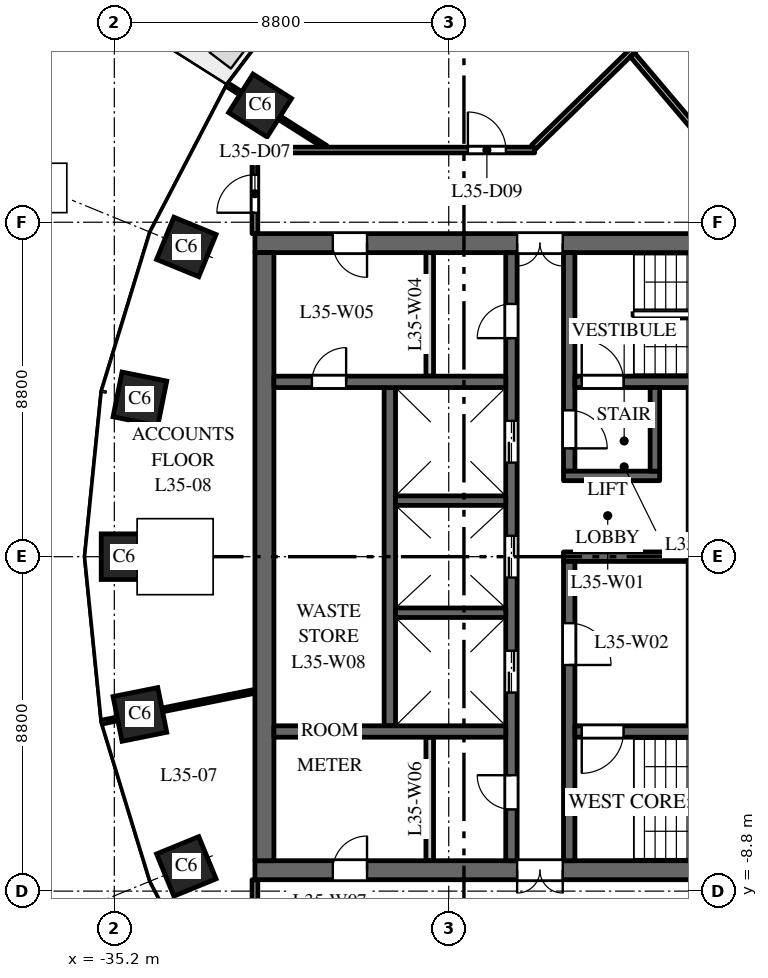
"""IFC4 building model, lengths in metres.
Left out: names, types, materials, properties, quantities, classifications, styles, units other than length and angle.
Written with IfcOpenShell. Run it as: python <this file> out.ifc"""

import sys

from ifc_helpers import new_model, si_unit, direction, frame, frame_2d, origin, origin_2d, place, context, subcontext, project, spatial, rectangle, extrude, element, fill, save


model = new_model("IFC4")
c1 = context("Model", 3, precision=1e-05, world=origin(), true_north=direction((0.0, 1.0)))
c2 = subcontext(c1, "Body", "Model", "MODEL_VIEW")
j1 = project(units=[si_unit("LENGTHUNIT", "METRE"), si_unit("PLANEANGLEUNIT", "RADIAN")], contexts=[c1])
p1 = place(None, origin())
s1 = spatial("IfcSite", under=j1, at=p1, CompositionType="ELEMENT")
p2 = place(p1, origin())
s2 = spatial("IfcBuilding", under=s1, at=p2, CompositionType="ELEMENT")
p3 = place(p2, frame((0.0, 0.0, 154.0)))
s3 = spatial("IfcBuildingStorey", under=s2, at=p3, CompositionType="ELEMENT", Elevation=154.0)
for number, where, z_axis, x_axis in (
    (1, (-31.365, 11.871, 0.0), (0.0, 0.0, 1.0), (-0.535, -0.845, 0.0)),
    (2, (-33.305, 8.149, 0.0), (0.0, 0.0, 1.0), (-0.379, -0.925, 0.0)),
    (3, (-34.527, 4.151, 0.0), (0.0, 0.0, 1.0), (-0.197, -0.98, 0.0)),
    (4, (-34.945, 0.0, 0.0), (0.0, 0.0, 1.0), (0.0, -1.0, 0.0)),
    (5, (-34.527, -4.151, 0.0), (0.0, 0.0, 1.0), (0.197, -0.98, 0.0)),
    (6, (-33.305, -8.149, 0.0), (0.0, 0.0, 1.0), (0.379, -0.925, 0.0)),
):
    element("IfcColumn", number, at=place(p3, frame(where, z_axis=z_axis, x_axis=x_axis)), inside=s3, PredefinedType="COLUMN", context=c2, shape_type="SweptSolid", body=[
        extrude(rectangle(XDim=1.2, YDim=1.2, at=origin_2d()), origin(), (0.0, 0.0, 1.0), 4.0),
    ])
p4 = place(p3, frame((-16.5, 8.25, 0.0), z_axis=(0.0, 0.0, 1.0), x_axis=(-1.0, 0.0, 0.0)))
e7 = element("IfcWall", 7, at=p4, inside=s3, PredefinedType="SHEAR", context=c2, shape_type="SweptSolid", body=[
    extrude(rectangle(XDim=15.0, YDim=0.5, at=frame_2d((7.5, 0.0))), origin(), (0.0, 0.0, 1.0), 3.7),
])
p5 = place(p4, frame((6.9, 0.0, 0.0)))
e8 = element("IfcOpeningElement", 8, at=p5, cuts=e7, PredefinedType="OPENING", context=c2, shape_type="SweptSolid", body=[
    extrude(rectangle(XDim=1.2, YDim=2.1, at=frame_2d((0.6, 1.05))), frame((0.0, 0.26, 0.0), z_axis=(0.0, -1.0, 0.0), x_axis=(1.0, 0.0, 0.0)), (0.0, 0.0, 1.0), 0.52),
])
p6 = place(p4, frame((12.05, 0.0, 0.0)))
e9 = element("IfcOpeningElement", 9, at=p6, cuts=e7, PredefinedType="OPENING", context=c2, shape_type="SweptSolid", body=[
    extrude(rectangle(XDim=0.9, YDim=2.1, at=frame_2d((0.45, 1.05))), frame((0.0, 0.26, 0.0), z_axis=(0.0, -1.0, 0.0), x_axis=(1.0, 0.0, 0.0)), (0.0, 0.0, 1.0), 0.52),
])
p7 = place(p3, frame((-16.5, -8.25, 0.0), z_axis=(0.0, 0.0, 1.0), x_axis=(-1.0, 0.0, 0.0)))
e10 = element("IfcWall", 10, at=p7, inside=s3, PredefinedType="SHEAR", context=c2, shape_type="SweptSolid", body=[
    extrude(rectangle(XDim=15.0, YDim=0.5, at=frame_2d((7.5, 0.0))), origin(), (0.0, 0.0, 1.0), 3.7),
])
p8 = place(p7, frame((6.9, 0.0, 0.0)))
e11 = element("IfcOpeningElement", 11, at=p8, cuts=e10, PredefinedType="OPENING", context=c2, shape_type="SweptSolid", body=[
    extrude(rectangle(XDim=1.2, YDim=2.1, at=frame_2d((0.6, 1.05))), frame((0.0, 0.26, 0.0), z_axis=(0.0, -1.0, 0.0), x_axis=(1.0, 0.0, 0.0)), (0.0, 0.0, 1.0), 0.52),
])
p9 = place(p7, frame((12.05, 0.0, 0.0)))
e12 = element("IfcOpeningElement", 12, at=p9, cuts=e10, PredefinedType="OPENING", context=c2, shape_type="SweptSolid", body=[
    extrude(rectangle(XDim=0.9, YDim=2.1, at=frame_2d((0.45, 1.05))), frame((0.0, 0.26, 0.0), z_axis=(0.0, -1.0, 0.0), x_axis=(1.0, 0.0, 0.0)), (0.0, 0.0, 1.0), 0.52),
])
p10 = place(p3, frame((-27.95, -4.45, 0.0), z_axis=(0.0, 0.0, 1.0), x_axis=(0.0, 1.0, 0.0)))
e13 = element("IfcWall", 13, at=p10, inside=s3, PredefinedType="SHEAR", context=c2, shape_type="SweptSolid", body=[
    extrude(rectangle(XDim=8.9, YDim=0.3, at=frame_2d((4.45, 0.0))), origin(), (0.0, 0.0, 1.0), 3.7),
])
p11 = place(p3, frame((-24.75, -8.0, 0.0), z_axis=(0.0, 0.0, 1.0), x_axis=(0.0, 1.0, 0.0)))
e14 = element("IfcWall", 14, at=p11, inside=s3, PredefinedType="SHEAR", context=c2, shape_type="SweptSolid", body=[
    extrude(rectangle(XDim=16.0, YDim=0.3, at=frame_2d((8.0, 0.0))), origin(), (0.0, 0.0, 1.0), 3.7),
])
p12 = place(p11, frame((4.425, 0.0, 0.0)))
e15 = element("IfcOpeningElement", 15, at=p12, cuts=e14, PredefinedType="OPENING", context=c2, shape_type="SweptSolid", body=[
    extrude(rectangle(XDim=1.1, YDim=2.1, at=frame_2d((0.55, 1.05))), frame((0.0, 0.16, 0.0), z_axis=(0.0, -1.0, 0.0), x_axis=(1.0, 0.0, 0.0)), (0.0, 0.0, 1.0), 0.32),
])
p13 = place(p11, frame((7.45, 0.0, 0.0)))
e16 = element("IfcOpeningElement", 16, at=p13, cuts=e14, PredefinedType="OPENING", context=c2, shape_type="SweptSolid", body=[
    extrude(rectangle(XDim=1.1, YDim=2.1, at=frame_2d((0.55, 1.05))), frame((0.0, 0.16, 0.0), z_axis=(0.0, -1.0, 0.0), x_axis=(1.0, 0.0, 0.0)), (0.0, 0.0, 1.0), 0.32),
])
p14 = place(p11, frame((10.475, 0.0, 0.0)))
e17 = element("IfcOpeningElement", 17, at=p14, cuts=e14, PredefinedType="OPENING", context=c2, shape_type="SweptSolid", body=[
    extrude(rectangle(XDim=1.1, YDim=2.1, at=frame_2d((0.55, 1.05))), frame((0.0, 0.16, 0.0), z_axis=(0.0, -1.0, 0.0), x_axis=(1.0, 0.0, 0.0)), (0.0, 0.0, 1.0), 0.32),
])
p15 = place(p11, frame((13.75, 0.0, 0.0)))
e18 = element("IfcOpeningElement", 18, at=p15, cuts=e14, PredefinedType="OPENING", context=c2, shape_type="SweptSolid", body=[
    extrude(rectangle(XDim=0.9, YDim=2.1, at=frame_2d((0.45, 1.05))), frame((0.0, 0.16, 0.0), z_axis=(0.0, -1.0, 0.0), x_axis=(1.0, 0.0, 0.0)), (0.0, 0.0, 1.0), 0.32),
])
p16 = place(p11, frame((1.35, 0.0, 0.0)))
e19 = element("IfcOpeningElement", 19, at=p16, cuts=e14, PredefinedType="OPENING", context=c2, shape_type="SweptSolid", body=[
    extrude(rectangle(XDim=0.9, YDim=2.1, at=frame_2d((0.45, 1.05))), frame((0.0, 0.16, 0.0), z_axis=(0.0, -1.0, 0.0), x_axis=(1.0, 0.0, 0.0)), (0.0, 0.0, 1.0), 0.32),
])
p17 = place(p3, frame((-20.1, 0.0, 0.0), z_axis=(0.0, 0.0, 1.0), x_axis=(-1.0, 0.0, 0.0)))
e20 = element("IfcWall", 20, at=p17, inside=s3, PredefinedType="SHEAR", context=c2, shape_type="SweptSolid", body=[
    extrude(rectangle(XDim=3.28, YDim=0.25, at=frame_2d((1.64, 0.0))), origin(), (0.0, 0.0, 1.0), 3.7),
])
p18 = place(p3, frame((-31.25, -8.0, 0.0), z_axis=(0.0, 0.0, 1.0), x_axis=(0.0, 1.0, 0.0)))
e21 = element("IfcWall", 21, at=p18, inside=s3, PredefinedType="SHEAR", context=c2, shape_type="SweptSolid", body=[
    extrude(rectangle(XDim=16.0, YDim=0.5, at=frame_2d((8.0, 0.0))), origin(), (0.0, 0.0, 1.0), 3.7),
])
p19 = place(p3, frame((-24.9, 4.6, 0.0), z_axis=(0.0, 0.0, 1.0), x_axis=(-1.0, 0.0, 0.0)))
e22 = element("IfcWall", 22, at=p19, inside=s3, PredefinedType="SHEAR", context=c2, shape_type="SweptSolid", body=[
    extrude(rectangle(XDim=6.1, YDim=0.3, at=frame_2d((3.05, 0.0))), origin(), (0.0, 0.0, 1.0), 3.7),
])
p20 = place(p19, frame((4.2, 0.0, 0.0)))
e23 = element("IfcOpeningElement", 23, at=p20, cuts=e22, PredefinedType="OPENING", context=c2, shape_type="SweptSolid", body=[
    extrude(rectangle(XDim=0.9, YDim=2.1, at=frame_2d((0.45, 1.05))), frame((0.0, 0.16, 0.0), z_axis=(0.0, -1.0, 0.0), x_axis=(1.0, 0.0, 0.0)), (0.0, 0.0, 1.0), 0.32),
])
for number, where, z_axis, x_axis in (
    (24, (-26.9, 4.75, 0.0), (0.0, 0.0, 1.0), (0.0, 1.0, 0.0)),
    (25, (-26.9, -8.0, 0.0), (0.0, 0.0, 1.0), (0.0, 1.0, 0.0)),
):
    element("IfcWall", number, at=place(p3, frame(where, z_axis=z_axis, x_axis=x_axis)), inside=s3, PredefinedType="PARTITIONING", context=c2, shape_type="SweptSolid", body=[
        extrude(rectangle(XDim=3.25, YDim=0.2, at=frame_2d((1.625, 0.0))), origin(), (0.0, 0.0, 1.0), 3.7),
    ])
p21 = place(p3, frame((-24.9, -4.6, 0.0), z_axis=(0.0, 0.0, 1.0), x_axis=(-1.0, 0.0, 0.0)))
e26 = element("IfcWall", 26, at=p21, inside=s3, PredefinedType="SHEAR", context=c2, shape_type="SweptSolid", body=[
    extrude(rectangle(XDim=6.1, YDim=0.3, at=frame_2d((3.05, 0.0))), origin(), (0.0, 0.0, 1.0), 3.7),
])
for number, where, z_axis, x_axis in (
    (27, (-24.9, -1.475, 0.0), (0.0, 0.0, 1.0), (-1.0, 0.0, 0.0)),
    (28, (-24.9, 1.475, 0.0), (0.0, 0.0, 1.0), (-1.0, 0.0, 0.0)),
):
    element("IfcWall", number, at=place(p3, frame(where, z_axis=z_axis, x_axis=x_axis)), inside=s3, PredefinedType="SHEAR", context=c2, shape_type="SweptSolid", body=[
        extrude(rectangle(XDim=2.9, YDim=0.25, at=frame_2d((1.45, 0.0))), origin(), (0.0, 0.0, 1.0), 3.7),
    ])
p22 = place(p3, frame((-23.23, 2.25, 0.0), z_axis=(0.0, 0.0, 1.0), x_axis=(0.0, 1.0, 0.0)))
e29 = element("IfcWall", 29, at=p22, inside=s3, PredefinedType="SHEAR", context=c2, shape_type="SweptSolid", body=[
    extrude(rectangle(XDim=5.75, YDim=0.3, at=frame_2d((2.875, 0.0))), origin(), (0.0, 0.0, 1.0), 3.7),
])
p23 = place(p22, frame((0.6, 0.0, 0.0)))
e30 = element("IfcOpeningElement", 30, at=p23, cuts=e29, PredefinedType="OPENING", context=c2, shape_type="SweptSolid", body=[
    extrude(rectangle(XDim=1.0, YDim=2.1, at=frame_2d((0.5, 1.05))), frame((0.0, 0.16, 0.0), z_axis=(0.0, -1.0, 0.0), x_axis=(1.0, 0.0, 0.0)), (0.0, 0.0, 1.0), 0.32),
])
p24 = place(p3, frame((-23.23, -8.0, 0.0), z_axis=(0.0, 0.0, 1.0), x_axis=(0.0, 1.0, 0.0)))
e31 = element("IfcWall", 31, at=p24, inside=s3, PredefinedType="SHEAR", context=c2, shape_type="SweptSolid", body=[
    extrude(rectangle(XDim=7.875, YDim=0.3, at=frame_2d((3.938, 0.0))), origin(), (0.0, 0.0, 1.0), 3.7),
])
p25 = place(p24, frame((5.15, 0.0, 0.0)))
e32 = element("IfcOpeningElement", 32, at=p25, cuts=e31, PredefinedType="OPENING", context=c2, shape_type="SweptSolid", body=[
    extrude(rectangle(XDim=1.1, YDim=2.1, at=frame_2d((0.55, 1.05))), frame((0.0, 0.16, 0.0), z_axis=(0.0, -1.0, 0.0), x_axis=(1.0, 0.0, 0.0)), (0.0, 0.0, 1.0), 0.32),
])
p26 = place(p3, frame((-16.9, 4.6, 0.0), z_axis=(0.0, 0.0, 1.0), x_axis=(-1.0, 0.0, 0.0)))
e33 = element("IfcWall", 33, at=p26, inside=s3, PredefinedType="SHEAR", context=c2, shape_type="SweptSolid", body=[
    extrude(rectangle(XDim=6.18, YDim=0.3, at=frame_2d((3.09, 0.0))), origin(), (0.0, 0.0, 1.0), 3.7),
])
p27 = place(p26, frame((4.9, 0.0, 0.0)))
e34 = element("IfcOpeningElement", 34, at=p27, cuts=e33, PredefinedType="OPENING", context=c2, shape_type="SweptSolid", body=[
    extrude(rectangle(XDim=1.1, YDim=2.1, at=frame_2d((0.55, 1.05))), frame((0.0, 0.16, 0.0), z_axis=(0.0, -1.0, 0.0), x_axis=(1.0, 0.0, 0.0)), (0.0, 0.0, 1.0), 0.32),
])
p28 = place(p3, frame((-16.9, -4.6, 0.0), z_axis=(0.0, 0.0, 1.0), x_axis=(-1.0, 0.0, 0.0)))
e35 = element("IfcWall", 35, at=p28, inside=s3, PredefinedType="SHEAR", context=c2, shape_type="SweptSolid", body=[
    extrude(rectangle(XDim=6.18, YDim=0.3, at=frame_2d((3.09, 0.0))), origin(), (0.0, 0.0, 1.0), 3.7),
])
p29 = place(p28, frame((4.9, 0.0, 0.0)))
e36 = element("IfcOpeningElement", 36, at=p29, cuts=e35, PredefinedType="OPENING", context=c2, shape_type="SweptSolid", body=[
    extrude(rectangle(XDim=1.1, YDim=2.1, at=frame_2d((0.55, 1.05))), frame((0.0, 0.16, 0.0), z_axis=(0.0, -1.0, 0.0), x_axis=(1.0, 0.0, 0.0)), (0.0, 0.0, 1.0), 0.32),
])
p30 = place(p3, frame((-20.85, 2.125, 0.0), z_axis=(0.0, 0.0, 1.0), x_axis=(-1.0, 0.0, 0.0)))
e37 = element("IfcWall", 37, at=p30, inside=s3, PredefinedType="SHEAR", context=c2, shape_type="SweptSolid", body=[
    extrude(rectangle(XDim=2.53, YDim=0.25, at=frame_2d((1.265, 0.0))), origin(), (0.0, 0.0, 1.0), 3.7),
])
p31 = place(p3, frame((-20.975, 2.25, 0.0), z_axis=(0.0, 0.0, 1.0), x_axis=(0.0, 1.0, 0.0)))
e38 = element("IfcWall", 38, at=p31, inside=s3, PredefinedType="SHEAR", context=c2, shape_type="SweptSolid", body=[
    extrude(rectangle(XDim=2.2, YDim=0.25, at=frame_2d((1.1, 0.0))), origin(), (0.0, 0.0, 1.0), 3.7),
])
p32 = place(p3, frame((-35.512, -4.349, 0.0), z_axis=(0.0, 0.0, 1.0), x_axis=(0.980357474535, 0.197228857227, 0.0)))
e39 = element("IfcWall", 39, at=p32, inside=s3, PredefinedType="PARTITIONING", context=c2, shape_type="SweptSolid", body=[
    extrude(rectangle(XDim=4.092, YDim=0.1, at=frame_2d((2.046, 0.0))), origin(), (0.0, 0.0, 1.0), 3.2),
])
p33 = place(p3, frame((-32.212, 12.408, 0.0), z_axis=(0.0, 0.0, 1.0), x_axis=(0.844810627195, -0.535065420467, 0.0)))
e40 = element("IfcWall", 40, at=p33, inside=s3, PredefinedType="PARTITIONING", context=c2, shape_type="SweptSolid", body=[
    extrude(rectangle(XDim=3.048, YDim=0.1, at=frame_2d((1.524, 0.0))), origin(), (0.0, 0.0, 1.0), 3.7),
])
p34 = place(p3, frame((-31.5, -10.7, 0.0), z_axis=(0.0, 0.0, 1.0), x_axis=(0.0, 1.0, 0.0)))
e41 = element("IfcWall", 41, at=p34, inside=s3, PredefinedType="PARTITIONING", context=c2, shape_type="SweptSolid", body=[
    extrude(rectangle(XDim=2.2, YDim=0.15, at=frame_2d((1.1, 0.0))), origin(), (0.0, 0.0, 1.0), 3.7),
])
p35 = place(p34, frame((0.55, 0.0, 0.0)))
e42 = element("IfcOpeningElement", 42, at=p35, cuts=e41, PredefinedType="OPENING", context=c2, shape_type="SweptSolid", body=[
    extrude(rectangle(XDim=1.0, YDim=2.1, at=frame_2d((0.5, 1.05))), frame((0.0, 0.085, 0.0), z_axis=(0.0, -1.0, 0.0), x_axis=(1.0, 0.0, 0.0)), (0.0, 0.0, 1.0), 0.17),
])
p36 = place(p3, frame((-31.5, 8.5, 0.0), z_axis=(0.0, 0.0, 1.0), x_axis=(0.0, 1.0, 0.0)))
e43 = element("IfcWall", 43, at=p36, inside=s3, PredefinedType="PARTITIONING", context=c2, shape_type="SweptSolid", body=[
    extrude(rectangle(XDim=2.2, YDim=0.15, at=frame_2d((1.1, 0.0))), origin(), (0.0, 0.0, 1.0), 3.7),
])
p37 = place(p36, frame((0.55, 0.0, 0.0)))
e44 = element("IfcOpeningElement", 44, at=p37, cuts=e43, PredefinedType="OPENING", context=c2, shape_type="SweptSolid", body=[
    extrude(rectangle(XDim=1.0, YDim=2.1, at=frame_2d((0.5, 1.05))), frame((0.0, 0.085, 0.0), z_axis=(0.0, -1.0, 0.0), x_axis=(1.0, 0.0, 0.0)), (0.0, 0.0, 1.0), 0.17),
])
p38 = place(p3, frame((-31.5, 10.7, 0.0), z_axis=(0.0, 0.0, 1.0), x_axis=(1.0, 0.0, 0.0)))
e45 = element("IfcWall", 45, at=p38, inside=s3, PredefinedType="PARTITIONING", context=c2, shape_type="SweptSolid", body=[
    extrude(rectangle(XDim=7.361, YDim=0.15, at=frame_2d((3.681, 0.0))), origin(), (0.0, 0.0, 1.0), 3.1),
])
p39 = place(p38, frame((5.604, 0.0, 0.0)))
e46 = element("IfcOpeningElement", 46, at=p39, cuts=e45, PredefinedType="OPENING", context=c2, shape_type="SweptSolid", body=[
    extrude(rectangle(XDim=1.0, YDim=2.1, at=frame_2d((0.5, 1.05))), frame((0.0, 0.085, 0.0), z_axis=(0.0, -1.0, 0.0), x_axis=(1.0, 0.0, 0.0)), (0.0, 0.0, 1.0), 0.17),
])
p40 = place(p3, frame((-24.166, 10.778, 0.0), z_axis=(0.0, 0.0, 1.0), x_axis=(0.715834142481, 0.698270349119, 0.0)))
e47 = element("IfcWall", 47, at=p40, inside=s3, PredefinedType="PARTITIONING", context=c2, shape_type="SweptSolid", body=[
    extrude(rectangle(XDim=7.242, YDim=0.15, at=frame_2d((3.621, 0.0))), origin(), (0.0, 0.0, 1.0), 2.75),
])
p41 = place(p3, frame((-21.568, 13.207, 0.0), z_axis=(0.0, 0.0, 1.0), x_axis=(0.646414818584, -0.762986161287, 0.0)))
e48 = element("IfcWall", 48, at=p41, inside=s3, PredefinedType="PARTITIONING", context=c2, shape_type="SweptSolid", body=[
    extrude(rectangle(XDim=3.38, YDim=0.15, at=frame_2d((1.69, 0.0))), origin(), (0.0, 0.0, 1.0), 3.7),
])
p42 = place(p12, origin())
e49 = element("IfcDoor", 49, at=p42, inside=s3, OperationType="DOUBLE_DOOR_SLIDING", PredefinedType="DOOR", context=c2, shape_type="SweptSolid", body=[
    extrude(rectangle(XDim=1.1, YDim=2.1, at=frame_2d((0.55, 1.05))), frame((0.0, 0.025, 0.0), z_axis=(0.0, -1.0, 0.0), x_axis=(1.0, 0.0, 0.0)), (0.0, 0.0, 1.0), 0.05),
])
fill(e15, e49)
p43 = place(p13, origin())
e50 = element("IfcDoor", 50, at=p43, inside=s3, OperationType="DOUBLE_DOOR_SLIDING", PredefinedType="DOOR", context=c2, shape_type="SweptSolid", body=[
    extrude(rectangle(XDim=1.1, YDim=2.1, at=frame_2d((0.55, 1.05))), frame((0.0, 0.025, 0.0), z_axis=(0.0, -1.0, 0.0), x_axis=(1.0, 0.0, 0.0)), (0.0, 0.0, 1.0), 0.05),
])
fill(e16, e50)
p44 = place(p14, origin())
e51 = element("IfcDoor", 51, at=p44, inside=s3, OperationType="DOUBLE_DOOR_SLIDING", PredefinedType="DOOR", context=c2, shape_type="SweptSolid", body=[
    extrude(rectangle(XDim=1.1, YDim=2.1, at=frame_2d((0.55, 1.05))), frame((0.0, 0.025, 0.0), z_axis=(0.0, -1.0, 0.0), x_axis=(1.0, 0.0, 0.0)), (0.0, 0.0, 1.0), 0.05),
])
fill(e17, e51)
p45 = place(p27, origin())
e52 = element("IfcDoor", 52, at=p45, inside=s3, OperationType="SINGLE_SWING_RIGHT", PredefinedType="DOOR", context=c2, shape_type="SweptSolid", body=[
    extrude(rectangle(XDim=1.1, YDim=2.1, at=frame_2d((0.55, 1.05))), frame((0.0, 0.025, 0.0), z_axis=(0.0, -1.0, 0.0), x_axis=(1.0, 0.0, 0.0)), (0.0, 0.0, 1.0), 0.05),
])
fill(e34, e52)
p46 = place(p29, origin())
e53 = element("IfcDoor", 53, at=p46, inside=s3, OperationType="SINGLE_SWING_LEFT", PredefinedType="DOOR", context=c2, shape_type="SweptSolid", body=[
    extrude(rectangle(XDim=1.1, YDim=2.1, at=frame_2d((0.55, 1.05))), frame((0.0, 0.025, 0.0), z_axis=(0.0, -1.0, 0.0), x_axis=(1.0, 0.0, 0.0)), (0.0, 0.0, 1.0), 0.05),
])
fill(e36, e53)
p47 = place(p25, origin())
e54 = element("IfcDoor", 54, at=p47, inside=s3, OperationType="SINGLE_SWING_LEFT", PredefinedType="DOOR", context=c2, shape_type="SweptSolid", body=[
    extrude(rectangle(XDim=1.1, YDim=2.1, at=frame_2d((0.55, 1.05))), frame((0.0, 0.025, 0.0), z_axis=(0.0, -1.0, 0.0), x_axis=(1.0, 0.0, 0.0)), (0.0, 0.0, 1.0), 0.05),
])
fill(e32, e54)
p48 = place(p23, origin())
e55 = element("IfcDoor", 55, at=p48, inside=s3, OperationType="SINGLE_SWING_LEFT", PredefinedType="DOOR", context=c2, shape_type="SweptSolid", body=[
    extrude(rectangle(XDim=1.0, YDim=2.1, at=frame_2d((0.5, 1.05))), frame((0.0, 0.025, 0.0), z_axis=(0.0, -1.0, 0.0), x_axis=(1.0, 0.0, 0.0)), (0.0, 0.0, 1.0), 0.05),
])
fill(e30, e55)
p49 = place(p5, origin())
e56 = element("IfcDoor", 56, at=p49, inside=s3, OperationType="DOUBLE_DOOR_DOUBLE_SWING", PredefinedType="DOOR", context=c2, shape_type="SweptSolid", body=[
    extrude(rectangle(XDim=1.2, YDim=2.1, at=frame_2d((0.6, 1.05))), frame((0.0, 0.025, 0.0), z_axis=(0.0, -1.0, 0.0), x_axis=(1.0, 0.0, 0.0)), (0.0, 0.0, 1.0), 0.05),
])
fill(e8, e56)
p50 = place(p8, origin())
e57 = element("IfcDoor", 57, at=p50, inside=s3, OperationType="DOUBLE_DOOR_DOUBLE_SWING", PredefinedType="DOOR", context=c2, shape_type="SweptSolid", body=[
    extrude(rectangle(XDim=1.2, YDim=2.1, at=frame_2d((0.6, 1.05))), frame((0.0, 0.025, 0.0), z_axis=(0.0, -1.0, 0.0), x_axis=(1.0, 0.0, 0.0)), (0.0, 0.0, 1.0), 0.05),
])
fill(e11, e57)
p51 = place(p15, origin())
e58 = element("IfcDoor", 58, at=p51, inside=s3, OperationType="SINGLE_SWING_RIGHT", PredefinedType="DOOR", context=c2, shape_type="SweptSolid", body=[
    extrude(rectangle(XDim=0.9, YDim=2.1, at=frame_2d((0.45, 1.05))), frame((0.0, 0.025, 0.0), z_axis=(0.0, -1.0, 0.0), x_axis=(1.0, 0.0, 0.0)), (0.0, 0.0, 1.0), 0.05),
])
fill(e18, e58)
p52 = place(p6, origin())
e59 = element("IfcDoor", 59, at=p52, inside=s3, OperationType="SINGLE_SWING_RIGHT", PredefinedType="DOOR", context=c2, shape_type="SweptSolid", body=[
    extrude(rectangle(XDim=0.9, YDim=2.1, at=frame_2d((0.45, 1.05))), frame((0.0, 0.025, 0.0), z_axis=(0.0, -1.0, 0.0), x_axis=(1.0, 0.0, 0.0)), (0.0, 0.0, 1.0), 0.05),
])
fill(e9, e59)
p53 = place(p16, origin())
e60 = element("IfcDoor", 60, at=p53, inside=s3, OperationType="SINGLE_SWING_LEFT", PredefinedType="DOOR", context=c2, shape_type="SweptSolid", body=[
    extrude(rectangle(XDim=0.9, YDim=2.1, at=frame_2d((0.45, 1.05))), frame((0.0, 0.025, 0.0), z_axis=(0.0, -1.0, 0.0), x_axis=(1.0, 0.0, 0.0)), (0.0, 0.0, 1.0), 0.05),
])
fill(e19, e60)
p54 = place(p9, origin())
e61 = element("IfcDoor", 61, at=p54, inside=s3, OperationType="SINGLE_SWING_LEFT", PredefinedType="DOOR", context=c2, shape_type="SweptSolid", body=[
    extrude(rectangle(XDim=0.9, YDim=2.1, at=frame_2d((0.45, 1.05))), frame((0.0, 0.025, 0.0), z_axis=(0.0, -1.0, 0.0), x_axis=(1.0, 0.0, 0.0)), (0.0, 0.0, 1.0), 0.05),
])
fill(e12, e61)
p55 = place(p20, origin())
e62 = element("IfcDoor", 62, at=p55, inside=s3, OperationType="SINGLE_SWING_LEFT", PredefinedType="DOOR", context=c2, shape_type="SweptSolid", body=[
    extrude(rectangle(XDim=0.9, YDim=2.1, at=frame_2d((0.45, 1.05))), frame((0.0, 0.025, 0.0), z_axis=(0.0, -1.0, 0.0), x_axis=(1.0, 0.0, 0.0)), (0.0, 0.0, 1.0), 0.05),
])
fill(e23, e62)
p56 = place(p37, origin())
e63 = element("IfcDoor", 63, at=p56, inside=s3, OperationType="SINGLE_SWING_LEFT", PredefinedType="DOOR", context=c2, shape_type="SweptSolid", body=[
    extrude(rectangle(XDim=1.0, YDim=2.1, at=frame_2d((0.5, 1.05))), frame((0.0, 0.025, 0.0), z_axis=(0.0, -1.0, 0.0), x_axis=(1.0, 0.0, 0.0)), (0.0, 0.0, 1.0), 0.05),
])
fill(e44, e63)
p57 = place(p39, origin())
e64 = element("IfcDoor", 64, at=p57, inside=s3, OperationType="SINGLE_SWING_LEFT", PredefinedType="DOOR", context=c2, shape_type="SweptSolid", body=[
    extrude(rectangle(XDim=1.0, YDim=2.1, at=frame_2d((0.5, 1.05))), frame((0.0, 0.025, 0.0), z_axis=(0.0, -1.0, 0.0), x_axis=(1.0, 0.0, 0.0)), (0.0, 0.0, 1.0), 0.05),
])
fill(e46, e64)
save(model, sys.argv[1])
